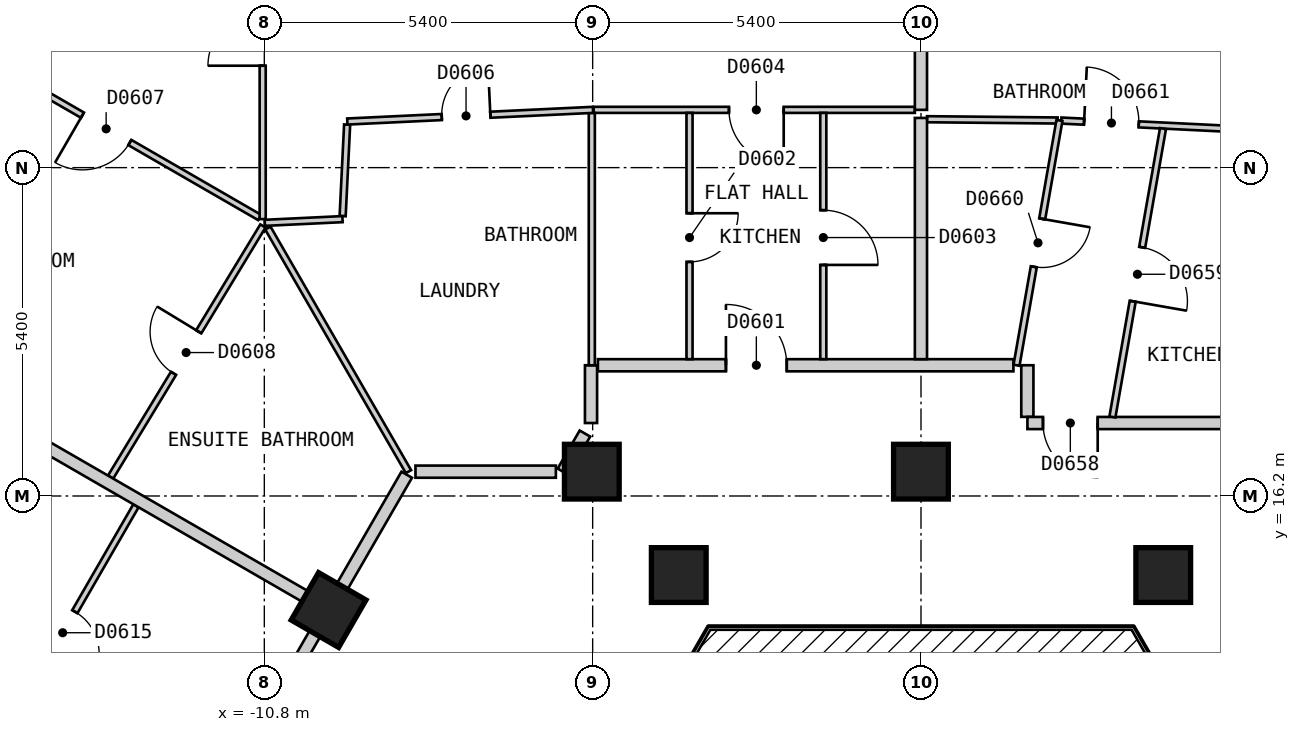
"""IFC4 building model, lengths in metres.
Left out: names, types, materials, properties, quantities, classifications, styles, units other than length and angle.
Written with IfcOpenShell. Run it as: python <this file> out.ifc"""

import sys

from ifc_helpers import new_model, si_unit, direction, frame, frame_2d, origin, origin_2d, place, context, subcontext, project, spatial, rectangle, extrude, element, fill, save


model = new_model("IFC4")
c1 = context("Model", 3, precision=1e-05, world=origin(), true_north=direction((0.0, 1.0)))
c2 = subcontext(c1, "Body", "Model", "MODEL_VIEW")
j1 = project(units=[si_unit("LENGTHUNIT", "METRE"), si_unit("PLANEANGLEUNIT", "RADIAN")], contexts=[c1])
p1 = place(None, origin())
s1 = spatial("IfcSite", under=j1, at=p1, CompositionType="ELEMENT")
p2 = place(p1, origin())
s2 = spatial("IfcBuilding", under=s1, at=p2, CompositionType="ELEMENT")
p3 = place(p2, frame((0.0, 0.0, 75.0)))
s3 = spatial("IfcBuildingStorey", under=s2, at=p3, CompositionType="ELEMENT", Elevation=75.0)
for number, where, z_axis, x_axis in (
    (1, (3.984, 14.9, 0.0), (0.0, 0.0, 1.0), (1.0, 0.0, 0.0)),
    (2, (-0.001, 16.6, 0.0), (0.0, 0.0, 1.0), (-1.0, 0.0, 0.0)),
    (3, (-3.984, 14.9, 0.0), (0.0, 0.0, 1.0), (1.0, 0.0, 0.0)),
    (4, (-5.414, 16.6, 0.0), (0.0, 0.0, 1.0), (-1.0, 0.0, 0.0)),
    (5, (-9.743, 14.325, 0.0), (0.0, 0.0, 1.0), (-0.5, -0.866, 0.0)),
):
    element("IfcColumn", number, at=place(p3, frame(where, z_axis=z_axis, x_axis=x_axis)), inside=s3, PredefinedType="COLUMN", context=c2, shape_type="SweptSolid", body=[
        extrude(rectangle(XDim=0.9, YDim=0.9, at=origin_2d()), origin(), (0.0, 0.0, 1.0), 3.0),
    ])
p4 = place(p3, frame((1.749, 18.35, 0.0), z_axis=(0.0, 0.0, 1.0), x_axis=(0.0, -1.0, 0.0)))
e6 = element("IfcWall", 6, at=p4, inside=s3, PredefinedType="PARTITIONING", context=c2, shape_type="SweptSolid", body=[
    extrude(rectangle(XDim=0.849, YDim=0.2, at=frame_2d((0.425, 0.0))), origin(), (0.0, 0.0, 1.0), 2.7),
])
p5 = place(p3, frame((-8.314, 16.6, 0.0), z_axis=(0.0, 0.0, 1.0), x_axis=(1.0, 0.0, 0.0)))
e7 = element("IfcWall", 7, at=p5, inside=s3, PredefinedType="PARTITIONING", context=c2, shape_type="SweptSolid", body=[
    extrude(rectangle(XDim=2.309, YDim=0.2, at=frame_2d((1.155, 0.0))), origin(), (0.0, 0.0, 1.0), 2.7),
])
p6 = place(p3, frame((1.75, 17.4, 0.0), z_axis=(0.0, 0.0, 1.0), x_axis=(1.0, 0.0, 0.0)))
e8 = element("IfcWall", 8, at=p6, inside=s3, PredefinedType="PARTITIONING", context=c2, shape_type="SweptSolid", body=[
    extrude(rectangle(XDim=3.612, YDim=0.2, at=frame_2d((1.806, 0.0))), origin(), (0.0, 0.0, 1.0), 2.7),
])
p7 = place(p6, frame((0.256, 0.0, 0.0)))
e9 = element("IfcOpeningElement", 9, at=p7, cuts=e8, PredefinedType="OPENING", context=c2, shape_type="SweptSolid", body=[
    extrude(rectangle(XDim=0.9, YDim=2.1, at=frame_2d((0.45, 1.05))), frame((0.0, 0.11, 0.0), z_axis=(0.0, -1.0, 0.0), x_axis=(1.0, 0.0, 0.0)), (0.0, 0.0, 1.0), 0.22),
])
p8 = place(p3, frame((-5.314, 18.35, 0.0), z_axis=(0.0, 0.0, 1.0), x_axis=(1.0, 0.0, 0.0)))
e10 = element("IfcWall", 10, at=p8, inside=s3, PredefinedType="PARTITIONING", context=c2, shape_type="SweptSolid", body=[
    extrude(rectangle(XDim=6.834, YDim=0.2, at=frame_2d((3.417, 0.0))), origin(), (0.0, 0.0, 1.0), 2.7),
])
p9 = place(p8, frame((2.106, 0.0, 0.0)))
e11 = element("IfcOpeningElement", 11, at=p9, cuts=e10, PredefinedType="OPENING", context=c2, shape_type="SweptSolid", body=[
    extrude(rectangle(XDim=1.0, YDim=2.1, at=frame_2d((0.5, 1.05))), frame((0.0, 0.11, 0.0), z_axis=(0.0, -1.0, 0.0), x_axis=(1.0, 0.0, 0.0)), (0.0, 0.0, 1.0), 0.22),
])
p10 = place(p3, frame((-5.889, 16.6, 0.0), z_axis=(0.0, 0.0, 1.0), x_axis=(0.499839240638, 0.866118198353, 0.0)))
e12 = element("IfcWall", 12, at=p10, inside=s3, PredefinedType="PARTITIONING", context=c2, shape_type="SweptSolid", body=[
    extrude(rectangle(XDim=0.724, YDim=0.2, at=frame_2d((0.362, 0.0))), origin(), (0.0, 0.0, 1.0), 2.7),
])
p11 = place(p3, frame((-18.562, -0.951, 0.0), z_axis=(0.0, 0.0, 1.0), x_axis=(0.499992962407, 0.866029466902, 0.0)))
e13 = element("IfcWall", 13, at=p11, inside=s3, PredefinedType="PARTITIONING", context=c2, shape_type="SweptSolid", body=[
    extrude(rectangle(XDim=20.208, YDim=0.2, at=frame_2d((10.104, 0.0))), origin(), (0.0, 0.0, 1.0), 2.7),
])
p12 = place(p11, frame((9.604, 0.0, 0.0)))
e14 = element("IfcOpeningElement", 14, at=p12, cuts=e13, PredefinedType="OPENING", context=c2, shape_type="SweptSolid", body=[
    extrude(rectangle(XDim=1.0, YDim=2.1, at=frame_2d((0.5, 1.05))), frame((0.0, 0.11, 0.0), z_axis=(0.0, -1.0, 0.0), x_axis=(1.0, 0.0, 0.0)), (0.0, 0.0, 1.0), 0.22),
])
p13 = place(p3, frame((-5.427, 17.4, 0.0), z_axis=(0.0, 0.0, 1.0), x_axis=(0.0, 1.0, 0.0)))
e15 = element("IfcWall", 15, at=p13, inside=s3, PredefinedType="PARTITIONING", context=c2, shape_type="SweptSolid", body=[
    extrude(rectangle(XDim=0.95, YDim=0.2, at=frame_2d((0.475, 0.0))), origin(), (0.0, 0.0, 1.0), 2.7),
])
p14 = place(p3, frame((0.099, 22.396, 0.0), z_axis=(0.0, 0.0, 1.0), x_axis=(0.999952228611, -0.009774481889, 0.0)))
e16 = element("IfcWall", 16, at=p14, inside=s3, PredefinedType="PARTITIONING", context=c2, shape_type="SweptSolid", body=[
    extrude(rectangle(XDim=2.148, YDim=0.1, at=frame_2d((1.074, 0.0))), origin(), (0.0, 0.0, 1.0), 2.7),
])
p15 = place(p3, frame((-10.742, 20.606, 0.0), z_axis=(0.0, 0.0, 1.0), x_axis=(0.50003312339, -0.866006279142, 0.0)))
e17 = element("IfcWall", 17, at=p15, inside=s3, PredefinedType="PARTITIONING", context=c2, shape_type="SweptSolid", body=[
    extrude(rectangle(XDim=4.626, YDim=0.1, at=frame_2d((2.313, 0.0))), origin(), (0.0, 0.0, 1.0), 2.7),
])
p16 = place(p3, frame((2.307, 22.374, 0.0), z_axis=(0.0, 0.0, 1.0), x_axis=(0.998794685853, -0.049083352695, 0.0)))
e18 = element("IfcWall", 18, at=p16, inside=s3, PredefinedType="PARTITIONING", context=c2, shape_type="SweptSolid", body=[
    extrude(rectangle(XDim=3.079, YDim=0.1, at=frame_2d((1.54, 0.0))), origin(), (0.0, 0.0, 1.0), 2.7),
])
p17 = place(p16, frame((0.376, 0.0, 0.0)))
e19 = element("IfcOpeningElement", 19, at=p17, cuts=e18, PredefinedType="OPENING", context=c2, shape_type="SweptSolid", body=[
    extrude(rectangle(XDim=0.9, YDim=2.1, at=frame_2d((0.45, 1.05))), frame((0.0, 0.06, 0.0), z_axis=(0.0, -1.0, 0.0), x_axis=(1.0, 0.0, 0.0)), (0.0, 0.0, 1.0), 0.12),
])
p18 = place(p3, frame((-15.977, 23.725, 0.0), z_axis=(0.0, 0.0, 1.0), x_axis=(0.866028213039, -0.499995134196, 0.0)))
e20 = element("IfcWall", 20, at=p18, inside=s3, PredefinedType="PARTITIONING", context=c2, shape_type="SweptSolid", body=[
    extrude(rectangle(XDim=5.89, YDim=0.1, at=frame_2d((2.945, 0.0))), origin(), (0.0, 0.0, 1.0), 2.7),
])
p19 = place(p18, frame((2.524, 0.0, 0.0)))
e21 = element("IfcOpeningElement", 21, at=p19, cuts=e20, PredefinedType="OPENING", context=c2, shape_type="SweptSolid", body=[
    extrude(rectangle(XDim=0.9, YDim=2.1, at=frame_2d((0.45, 1.05))), frame((0.0, 0.06, 0.0), z_axis=(0.0, -1.0, 0.0), x_axis=(1.0, 0.0, 0.0)), (0.0, 0.0, 1.0), 0.12),
])
p20 = place(p3, frame((-21.001, 15.025, 0.0), z_axis=(0.0, 0.0, 1.0), x_axis=(0.866016855193, -0.500014806302, 0.0)))
e22 = element("IfcWall", 22, at=p20, inside=s3, PredefinedType="PARTITIONING", context=c2, shape_type="SweptSolid", body=[
    extrude(rectangle(XDim=10.0, YDim=0.1, at=frame_2d((5.0, 0.0))), origin(), (0.0, 0.0, 1.0), 2.7),
])
p21 = place(p20, frame((4.305, 0.0, 0.0)))
e23 = element("IfcOpeningElement", 23, at=p21, cuts=e22, PredefinedType="OPENING", context=c2, shape_type="SweptSolid", body=[
    extrude(rectangle(XDim=0.9, YDim=2.1, at=frame_2d((0.45, 1.05))), frame((0.0, 0.06, 0.0), z_axis=(0.0, -1.0, 0.0), x_axis=(1.0, 0.0, 0.0)), (0.0, 0.0, 1.0), 0.12),
])
p22 = place(p3, frame((-5.384, 22.55, 0.0), z_axis=(0.0, 0.0, 1.0), x_axis=(1.0, 0.0, 0.0)))
e24 = element("IfcWall", 24, at=p22, inside=s3, PredefinedType="PARTITIONING", context=c2, shape_type="SweptSolid", body=[
    extrude(rectangle(XDim=5.283, YDim=0.1, at=frame_2d((2.642, 0.0))), origin(), (0.0, 0.0, 1.0), 2.7),
])
p23 = place(p22, frame((2.226, 0.0, 0.0)))
e25 = element("IfcOpeningElement", 25, at=p23, cuts=e24, PredefinedType="OPENING", context=c2, shape_type="SweptSolid", body=[
    extrude(rectangle(XDim=0.9, YDim=2.1, at=frame_2d((0.45, 1.05))), frame((0.0, 0.06, 0.0), z_axis=(0.0, -1.0, 0.0), x_axis=(1.0, 0.0, 0.0)), (0.0, 0.0, 1.0), 0.12),
])
p24 = place(p3, frame((-13.328, 16.511, 0.0), z_axis=(0.0, 0.0, 1.0), x_axis=(0.518570528669, 0.855034857065, 0.0)))
e26 = element("IfcWall", 26, at=p24, inside=s3, PredefinedType="PARTITIONING", context=c2, shape_type="SweptSolid", body=[
    extrude(rectangle(XDim=4.83, YDim=0.1, at=frame_2d((2.415, 0.0))), origin(), (0.0, 0.0, 1.0), 2.7),
])
p25 = place(p24, frame((1.995, 0.0, 0.0)))
e27 = element("IfcOpeningElement", 27, at=p25, cuts=e26, PredefinedType="OPENING", context=c2, shape_type="SweptSolid", body=[
    extrude(rectangle(XDim=0.8, YDim=2.1, at=frame_2d((0.4, 1.05))), frame((0.0, 0.06, 0.0), z_axis=(0.0, -1.0, 0.0), x_axis=(1.0, 0.0, 0.0)), (0.0, 0.0, 1.0), 0.12),
])
p26 = place(p3, frame((-15.347, 11.819, 0.0), z_axis=(0.0, 0.0, 1.0), x_axis=(0.499943653708, 0.866057932887, 0.0)))
e28 = element("IfcWall", 28, at=p26, inside=s3, PredefinedType="PARTITIONING", context=c2, shape_type="SweptSolid", body=[
    extrude(rectangle(XDim=4.873, YDim=0.1, at=frame_2d((2.436, 0.0))), origin(), (0.0, 0.0, 1.0), 2.7),
])
p27 = place(p26, frame((2.062, 0.0, 0.0)))
e29 = element("IfcOpeningElement", 29, at=p27, cuts=e28, PredefinedType="OPENING", context=c2, shape_type="SweptSolid", body=[
    extrude(rectangle(XDim=0.8, YDim=2.1, at=frame_2d((0.4, 1.05))), frame((0.0, 0.06, 0.0), z_axis=(0.0, -1.0, 0.0), x_axis=(1.0, 0.0, 0.0)), (0.0, 0.0, 1.0), 0.12),
])
p28 = place(p3, frame((3.148, 17.5, 0.0), z_axis=(0.0, 0.0, 1.0), x_axis=(0.172821918451, 0.984953087463, 0.0)))
e30 = element("IfcWall", 30, at=p28, inside=s3, PredefinedType="PARTITIONING", context=c2, shape_type="SweptSolid", body=[
    extrude(rectangle(XDim=4.814, YDim=0.1, at=frame_2d((2.407, 0.0))), origin(), (0.0, 0.0, 1.0), 2.7),
])
p29 = place(p28, frame((1.932, 0.0, 0.0)))
e31 = element("IfcOpeningElement", 31, at=p29, cuts=e30, PredefinedType="OPENING", context=c2, shape_type="SweptSolid", body=[
    extrude(rectangle(XDim=0.9, YDim=2.1, at=frame_2d((0.45, 1.05))), frame((0.0, 0.06, 0.0), z_axis=(0.0, -1.0, 0.0), x_axis=(1.0, 0.0, 0.0)), (0.0, 0.0, 1.0), 0.12),
])
p30 = place(p3, frame((1.571, 18.35, 0.0), z_axis=(0.0, 0.0, 1.0), x_axis=(0.172742546726, 0.984967010895, 0.0)))
e32 = element("IfcWall", 32, at=p30, inside=s3, PredefinedType="PARTITIONING", context=c2, shape_type="SweptSolid", body=[
    extrude(rectangle(XDim=4.087, YDim=0.1, at=frame_2d((2.044, 0.0))), origin(), (0.0, 0.0, 1.0), 2.7),
])
p31 = place(p30, frame((1.644, 0.0, 0.0)))
e33 = element("IfcOpeningElement", 33, at=p31, cuts=e32, PredefinedType="OPENING", context=c2, shape_type="SweptSolid", body=[
    extrude(rectangle(XDim=0.8, YDim=2.1, at=frame_2d((0.4, 1.05))), frame((0.0, 0.06, 0.0), z_axis=(0.0, -1.0, 0.0), x_axis=(1.0, 0.0, 0.0)), (0.0, 0.0, 1.0), 0.12),
])
p32 = place(p3, frame((-9.512, 20.803, 0.0), z_axis=(0.0, 0.0, 1.0), x_axis=(0.049089165168, 0.998794400196, 0.0)))
e34 = element("IfcWall", 34, at=p32, inside=s3, PredefinedType="PARTITIONING", context=c2, shape_type="SweptSolid", body=[
    extrude(rectangle(XDim=1.507, YDim=0.1, at=frame_2d((0.753, 0.0))), origin(), (0.0, 0.0, 1.0), 2.7),
])
p33 = place(p3, frame((-3.807, 18.45, 0.0), z_axis=(0.0, 0.0, 1.0), x_axis=(0.0, 1.0, 0.0)))
e35 = element("IfcWall", 35, at=p33, inside=s3, PredefinedType="PARTITIONING", context=c2, shape_type="SweptSolid", body=[
    extrude(rectangle(XDim=4.05, YDim=0.1, at=frame_2d((2.025, 0.0))), origin(), (0.0, 0.0, 1.0), 2.7),
])
p34 = place(p33, frame((1.6, 0.0, 0.0)))
e36 = element("IfcOpeningElement", 36, at=p34, cuts=e35, PredefinedType="OPENING", context=c2, shape_type="SweptSolid", body=[
    extrude(rectangle(XDim=0.8, YDim=2.1, at=frame_2d((0.4, 1.05))), frame((0.0, 0.06, 0.0), z_axis=(0.0, -1.0, 0.0), x_axis=(1.0, 0.0, 0.0)), (0.0, 0.0, 1.0), 0.12),
])
p35 = place(p3, frame((-5.414, 18.35, 0.0), z_axis=(0.0, 0.0, 1.0), x_axis=(0.0, 1.0, 0.0)))
e37 = element("IfcWall", 37, at=p35, inside=s3, PredefinedType="PARTITIONING", context=c2, shape_type="SweptSolid", body=[
    extrude(rectangle(XDim=4.15, YDim=0.1, at=frame_2d((2.075, 0.0))), origin(), (0.0, 0.0, 1.0), 2.7),
])
p36 = place(p3, frame((-10.827, 20.753, 0.0), z_axis=(0.0, 0.0, 1.0), x_axis=(0.0, 1.0, 0.0)))
e38 = element("IfcWall", 38, at=p36, inside=s3, PredefinedType="PARTITIONING", context=c2, shape_type="SweptSolid", body=[
    extrude(rectangle(XDim=5.947, YDim=0.1, at=frame_2d((2.974, 0.0))), origin(), (0.0, 0.0, 1.0), 2.7),
])
p37 = place(p36, frame((2.523, 0.0, 0.0)))
e39 = element("IfcOpeningElement", 39, at=p37, cuts=e38, PredefinedType="OPENING", context=c2, shape_type="SweptSolid", body=[
    extrude(rectangle(XDim=0.9, YDim=2.1, at=frame_2d((0.45, 1.05))), frame((0.0, 0.06, 0.0), z_axis=(0.0, -1.0, 0.0), x_axis=(1.0, 0.0, 0.0)), (0.0, 0.0, 1.0), 0.12),
])
p38 = place(p3, frame((-1.607, 18.45, 0.0), z_axis=(0.0, 0.0, 1.0), x_axis=(0.0, 1.0, 0.0)))
e40 = element("IfcWall", 40, at=p38, inside=s3, PredefinedType="PARTITIONING", context=c2, shape_type="SweptSolid", body=[
    extrude(rectangle(XDim=4.05, YDim=0.1, at=frame_2d((2.025, 0.0))), origin(), (0.0, 0.0, 1.0), 2.7),
])
p39 = place(p38, frame((1.55, 0.0, 0.0)))
e41 = element("IfcOpeningElement", 41, at=p39, cuts=e40, PredefinedType="OPENING", context=c2, shape_type="SweptSolid", body=[
    extrude(rectangle(XDim=0.9, YDim=2.1, at=frame_2d((0.45, 1.05))), frame((0.0, 0.06, 0.0), z_axis=(0.0, -1.0, 0.0), x_axis=(1.0, 0.0, 0.0)), (0.0, 0.0, 1.0), 0.12),
])
p40 = place(p3, frame((-10.792, 20.692, 0.0), z_axis=(0.0, 0.0, 1.0), x_axis=(0.998861653202, 0.04770112957, 0.0)))
e42 = element("IfcWall", 42, at=p40, inside=s3, PredefinedType="PARTITIONING", context=c2, shape_type="SweptSolid", body=[
    extrude(rectangle(XDim=1.28, YDim=0.1, at=frame_2d((0.64, 0.0))), origin(), (0.0, 0.0, 1.0), 2.7),
])
p41 = place(p3, frame((-9.435, 22.358, 0.0), z_axis=(0.0, 0.0, 1.0), x_axis=(0.998871548472, 0.04749346959, 0.0)))
e43 = element("IfcWall", 43, at=p41, inside=s3, PredefinedType="PARTITIONING", context=c2, shape_type="SweptSolid", body=[
    extrude(rectangle(XDim=4.046, YDim=0.1, at=frame_2d((2.023, 0.0))), origin(), (0.0, 0.0, 1.0), 2.7),
])
p42 = place(p41, frame((1.555, 0.0, 0.0)))
e44 = element("IfcOpeningElement", 44, at=p42, cuts=e43, PredefinedType="OPENING", context=c2, shape_type="SweptSolid", body=[
    extrude(rectangle(XDim=0.8, YDim=2.1, at=frame_2d((0.4, 1.05))), frame((0.0, 0.06, 0.0), z_axis=(0.0, -1.0, 0.0), x_axis=(1.0, 0.0, 0.0)), (0.0, 0.0, 1.0), 0.12),
])
p43 = place(p3, frame((-18.489, 19.375, 0.0), z_axis=(0.0, 0.0, 1.0), x_axis=(0.866016855193, -0.500014806302, 0.0)))
e45 = element("IfcWall", 45, at=p43, inside=s3, PredefinedType="PARTITIONING", context=c2, shape_type="SweptSolid", body=[
    extrude(rectangle(XDim=10.0, YDim=0.2, at=frame_2d((5.0, 0.0))), origin(), (0.0, 0.0, 1.0), 2.7),
])
p44 = place(p3, frame((-0.001, 18.45, 0.0), z_axis=(0.0, 0.0, 1.0), x_axis=(0.0, 1.0, 0.0)))
e46 = element("IfcWall", 46, at=p44, inside=s3, PredefinedType="PARTITIONING", context=c2, shape_type="SweptSolid", body=[
    extrude(rectangle(XDim=3.967, YDim=0.2, at=frame_2d((1.983, 0.0))), origin(), (0.0, 0.0, 1.0), 2.7),
])
p45 = place(p3, frame((-0.001, 22.55, 0.0), z_axis=(0.0, 0.0, 1.0), x_axis=(0.0, 1.0, 0.0)))
e47 = element("IfcWall", 47, at=p45, inside=s3, PredefinedType="PARTITIONING", context=c2, shape_type="SweptSolid", body=[
    extrude(rectangle(XDim=4.15, YDim=0.2, at=frame_2d((2.075, 0.0))), origin(), (0.0, 0.0, 1.0), 2.7),
])
p46 = place(p9, origin())
e48 = element("IfcDoor", 48, at=p46, inside=s3, OperationType="SINGLE_SWING_LEFT", PredefinedType="DOOR", context=c2, shape_type="SweptSolid", body=[
    extrude(rectangle(XDim=1.0, YDim=2.1, at=frame_2d((0.5, 1.05))), frame((0.0, 0.025, 0.0), z_axis=(0.0, -1.0, 0.0), x_axis=(1.0, 0.0, 0.0)), (0.0, 0.0, 1.0), 0.05),
])
fill(e11, e48)
p47 = place(p34, origin())
e49 = element("IfcDoor", 49, at=p47, inside=s3, OperationType="SINGLE_SWING_RIGHT", PredefinedType="DOOR", context=c2, shape_type="SweptSolid", body=[
    extrude(rectangle(XDim=0.8, YDim=2.1, at=frame_2d((0.4, 1.05))), frame((0.0, 0.025, 0.0), z_axis=(0.0, -1.0, 0.0), x_axis=(1.0, 0.0, 0.0)), (0.0, 0.0, 1.0), 0.05),
])
fill(e36, e49)
p48 = place(p39, origin())
e50 = element("IfcDoor", 50, at=p48, inside=s3, OperationType="SINGLE_SWING_LEFT", PredefinedType="DOOR", context=c2, shape_type="SweptSolid", body=[
    extrude(rectangle(XDim=0.9, YDim=2.1, at=frame_2d((0.45, 1.05))), frame((0.0, 0.025, 0.0), z_axis=(0.0, -1.0, 0.0), x_axis=(1.0, 0.0, 0.0)), (0.0, 0.0, 1.0), 0.05),
])
fill(e41, e50)
p49 = place(p23, origin())
e51 = element("IfcDoor", 51, at=p49, inside=s3, OperationType="SINGLE_SWING_RIGHT", PredefinedType="DOOR", context=c2, shape_type="SweptSolid", body=[
    extrude(rectangle(XDim=0.9, YDim=2.1, at=frame_2d((0.45, 1.05))), frame((0.0, 0.025, 0.0), z_axis=(0.0, -1.0, 0.0), x_axis=(1.0, 0.0, 0.0)), (0.0, 0.0, 1.0), 0.05),
])
fill(e25, e51)
p50 = place(p37, origin())
e52 = element("IfcDoor", 52, at=p50, inside=s3, OperationType="SINGLE_SWING_LEFT", PredefinedType="DOOR", context=c2, shape_type="SweptSolid", body=[
    extrude(rectangle(XDim=0.9, YDim=2.1, at=frame_2d((0.45, 1.05))), frame((0.0, 0.025, 0.0), z_axis=(0.0, -1.0, 0.0), x_axis=(1.0, 0.0, 0.0)), (0.0, 0.0, 1.0), 0.05),
])
fill(e39, e52)
p51 = place(p42, origin())
e53 = element("IfcDoor", 53, at=p51, inside=s3, OperationType="SINGLE_SWING_RIGHT", PredefinedType="DOOR", context=c2, shape_type="SweptSolid", body=[
    extrude(rectangle(XDim=0.8, YDim=2.1, at=frame_2d((0.4, 1.05))), frame((0.0, 0.025, 0.0), z_axis=(0.0, -1.0, 0.0), x_axis=(1.0, 0.0, 0.0)), (0.0, 0.0, 1.0), 0.05),
])
fill(e44, e53)
p52 = place(p19, origin())
e54 = element("IfcDoor", 54, at=p52, inside=s3, OperationType="SINGLE_SWING_LEFT", PredefinedType="DOOR", context=c2, shape_type="SweptSolid", body=[
    extrude(rectangle(XDim=0.9, YDim=2.1, at=frame_2d((0.45, 1.05))), frame((0.0, 0.025, 0.0), z_axis=(0.0, -1.0, 0.0), x_axis=(1.0, 0.0, 0.0)), (0.0, 0.0, 1.0), 0.05),
])
fill(e21, e54)
p53 = place(p25, origin())
e55 = element("IfcDoor", 55, at=p53, inside=s3, OperationType="SINGLE_SWING_RIGHT", PredefinedType="DOOR", context=c2, shape_type="SweptSolid", body=[
    extrude(rectangle(XDim=0.8, YDim=2.1, at=frame_2d((0.4, 1.05))), frame((0.0, 0.025, 0.0), z_axis=(0.0, -1.0, 0.0), x_axis=(1.0, 0.0, 0.0)), (0.0, 0.0, 1.0), 0.05),
])
fill(e27, e55)
p54 = place(p27, origin())
e56 = element("IfcDoor", 56, at=p54, inside=s3, OperationType="SINGLE_SWING_LEFT", PredefinedType="DOOR", context=c2, shape_type="SweptSolid", body=[
    extrude(rectangle(XDim=0.8, YDim=2.1, at=frame_2d((0.4, 1.05))), frame((0.0, 0.025, 0.0), z_axis=(0.0, -1.0, 0.0), x_axis=(1.0, 0.0, 0.0)), (0.0, 0.0, 1.0), 0.05),
])
fill(e29, e56)
p55 = place(p7, origin())
e57 = element("IfcDoor", 57, at=p55, inside=s3, OperationType="SINGLE_SWING_RIGHT", PredefinedType="DOOR", context=c2, shape_type="SweptSolid", body=[
    extrude(rectangle(XDim=0.9, YDim=2.1, at=frame_2d((0.45, 1.05))), frame((0.0, 0.025, 0.0), z_axis=(0.0, -1.0, 0.0), x_axis=(1.0, 0.0, 0.0)), (0.0, 0.0, 1.0), 0.05),
])
fill(e9, e57)
p56 = place(p29, origin())
e58 = element("IfcDoor", 58, at=p56, inside=s3, OperationType="SINGLE_SWING_LEFT", PredefinedType="DOOR", context=c2, shape_type="SweptSolid", body=[
    extrude(rectangle(XDim=0.9, YDim=2.1, at=frame_2d((0.45, 1.05))), frame((0.0, 0.025, 0.0), z_axis=(0.0, -1.0, 0.0), x_axis=(1.0, 0.0, 0.0)), (0.0, 0.0, 1.0), 0.05),
])
fill(e31, e58)
p57 = place(p31, origin())
e59 = element("IfcDoor", 59, at=p57, inside=s3, OperationType="SINGLE_SWING_RIGHT", PredefinedType="DOOR", context=c2, shape_type="SweptSolid", body=[
    extrude(rectangle(XDim=0.8, YDim=2.1, at=frame_2d((0.4, 1.05))), frame((0.0, 0.025, 0.0), z_axis=(0.0, -1.0, 0.0), x_axis=(1.0, 0.0, 0.0)), (0.0, 0.0, 1.0), 0.05),
])
fill(e33, e59)
p58 = place(p17, origin())
e60 = element("IfcDoor", 60, at=p58, inside=s3, OperationType="SINGLE_SWING_LEFT", PredefinedType="DOOR", context=c2, shape_type="SweptSolid", body=[
    extrude(rectangle(XDim=0.9, YDim=2.1, at=frame_2d((0.45, 1.05))), frame((0.0, 0.025, 0.0), z_axis=(0.0, -1.0, 0.0), x_axis=(1.0, 0.0, 0.0)), (0.0, 0.0, 1.0), 0.05),
])
fill(e19, e60)
save(model, sys.argv[1])
